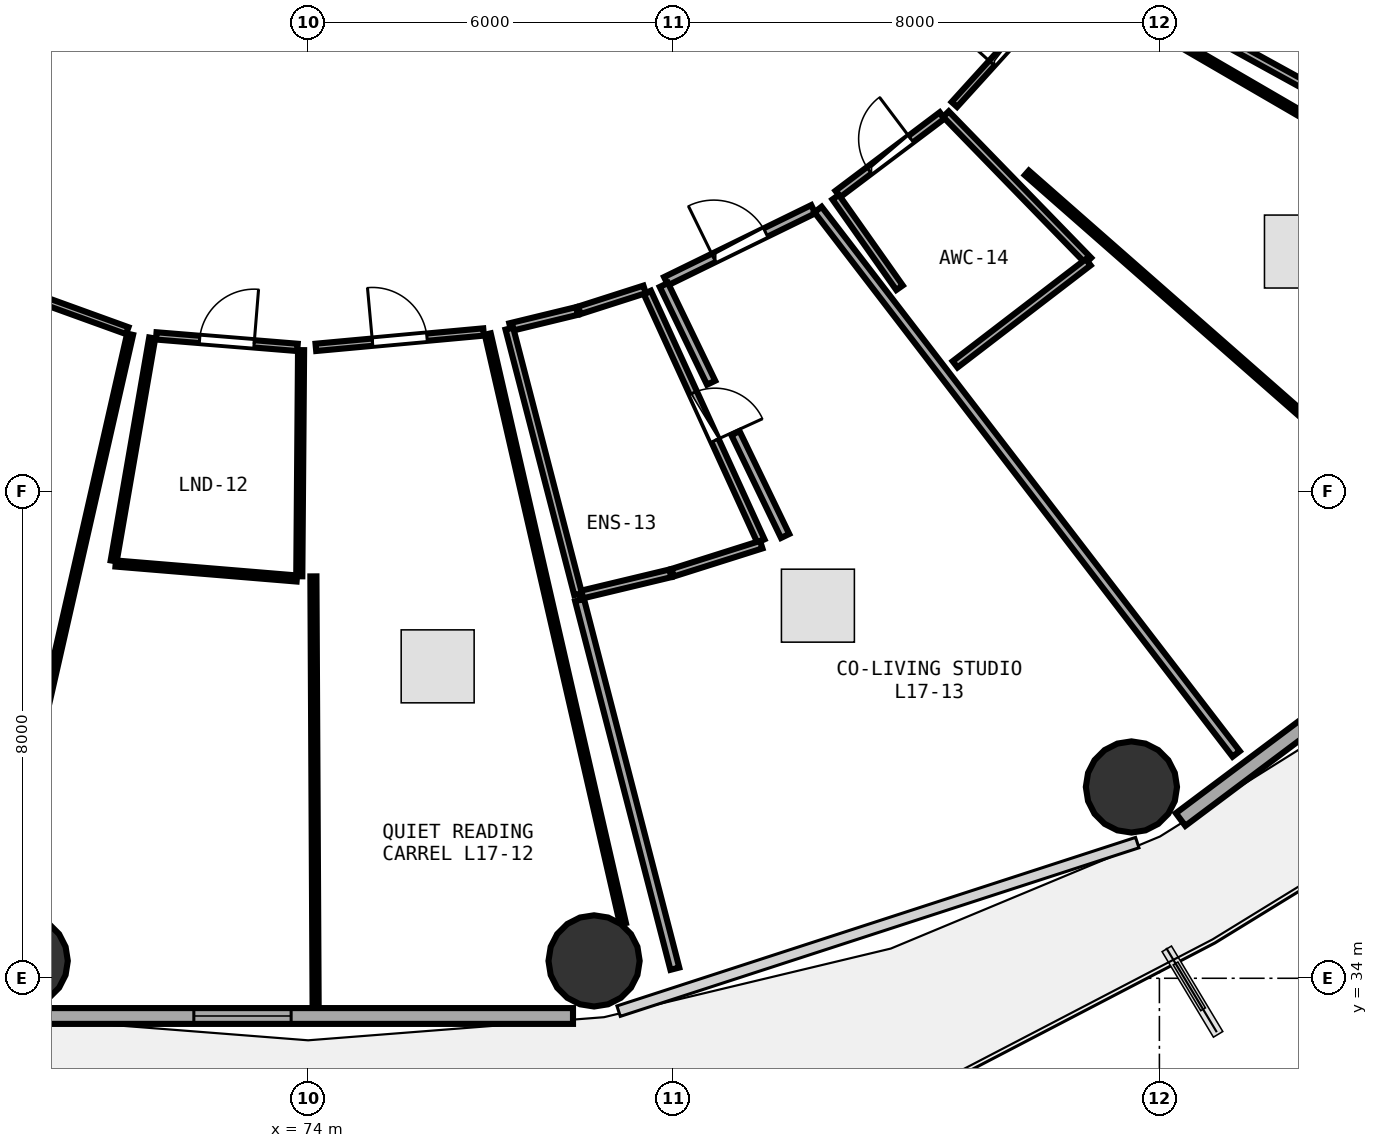
"""IFC4 building model, lengths in metres.
Left out: names, types, materials, properties, quantities, classifications, styles, units other than length and angle.
Written with IfcOpenShell. Run it as: python <this file> out.ifc"""

import sys

from ifc_helpers import new_model, si_unit, direction, frame, frame_2d, origin, origin_2d, place, context, subcontext, project, spatial, rectangle, circle, extrude, element, fill, save


model = new_model("IFC4")
c1 = context("Model", 3, precision=1e-05, world=origin(), true_north=direction((0.0, 1.0)))
c2 = subcontext(c1, "Body", "Model", "MODEL_VIEW")
j1 = project(units=[si_unit("LENGTHUNIT", "METRE"), si_unit("PLANEANGLEUNIT", "RADIAN")], contexts=[c1])
p1 = place(None, origin())
s1 = spatial("IfcSite", under=j1, at=p1, CompositionType="ELEMENT")
p2 = place(p1, origin())
s2 = spatial("IfcBuilding", under=s1, at=p2, CompositionType="ELEMENT")
p3 = place(p2, frame((0.0, 0.0, 67.5)))
s3 = spatial("IfcBuildingStorey", under=s2, at=p3, CompositionType="ELEMENT", Elevation=67.5)
for number, where, z_axis, x_axis in (
    (1, (69.298, 34.286, 0.0), (0.0, 0.0, 1.0), (1.0, 0.0, 0.0)),
    (2, (78.702, 34.286, 0.0), (0.0, 0.0, 1.0), (1.0, 0.0, 0.0)),
    (3, (87.54, 37.146, 0.0), (0.0, 0.0, 1.0), (1.0, 0.0, 0.0)),
):
    element("IfcColumn", number, at=place(p3, frame(where, z_axis=z_axis, x_axis=x_axis)), inside=s3, PredefinedType="COLUMN", context=c2, shape_type="SweptSolid", body=[
        extrude(circle(Radius=0.75, at=origin_2d()), origin(), (0.0, 0.0, 1.0), 4.76),
    ])
p4 = place(p3, frame((69.644, 33.38, 0.0), z_axis=(0.0, 0.0, 1.0), x_axis=(1.0, 0.0, 0.0)))
e4 = element("IfcWall", 4, at=p4, inside=s3, PredefinedType="SOLIDWALL", context=c2, shape_type="SweptSolid", body=[
    extrude(rectangle(XDim=8.712, YDim=0.26, at=frame_2d((4.356, 0.0))), origin(), (0.0, 0.0, 1.0), 4.345),
])
p5 = place(p4, frame((2.476, 0.0, 0.85)))
e5 = element("IfcOpeningElement", 5, at=p5, cuts=e4, PredefinedType="OPENING", context=c2, shape_type="SweptSolid", body=[
    extrude(rectangle(XDim=1.6, YDim=1.45, at=frame_2d((0.8, 0.725))), frame((0.0, 0.14, 0.0), z_axis=(0.0, -1.0, 0.0), x_axis=(1.0, 0.0, 0.0)), (0.0, 0.0, 1.0), 0.28),
])
p6 = place(p3, frame((88.349, 36.611, 0.0), z_axis=(0.0, 0.0, 1.0), x_axis=(0.80030733173, 0.599590005569, 0.0)))
e6 = element("IfcWall", 6, at=p6, inside=s3, PredefinedType="SOLIDWALL", context=c2, shape_type="SweptSolid", body=[
    extrude(rectangle(XDim=8.291, YDim=0.26, at=frame_2d((4.145, 0.0))), origin(), (0.0, 0.0, 1.0), 4.345),
])
p7 = place(p6, frame((3.345, 0.0, 0.85)))
e7 = element("IfcOpeningElement", 7, at=p7, cuts=e6, PredefinedType="OPENING", context=c2, shape_type="SweptSolid", body=[
    extrude(rectangle(XDim=1.6, YDim=1.45, at=frame_2d((0.8, 0.725))), frame((0.0, 0.14, 0.0), z_axis=(0.0, -1.0, 0.0), x_axis=(1.0, 0.0, 0.0)), (0.0, 0.0, 1.0), 0.28),
])
p8 = place(p3, frame((66.025, 46.458, 0.0), z_axis=(0.0, 0.0, 1.0), x_axis=(0.940384663849, -0.340112751891, 0.0)))
e8 = element("IfcWall", 8, at=p8, inside=s3, PredefinedType="PARTITIONING", context=c2, shape_type="SweptSolid", body=[
    extrude(rectangle(XDim=5.316, YDim=0.12, at=frame_2d((2.658, 0.0))), origin(), (0.0, 0.0, 1.0), 2.345),
])
p9 = place(p8, frame((2.208, 0.0, 0.0)))
e9 = element("IfcOpeningElement", 9, at=p9, cuts=e8, PredefinedType="OPENING", context=c2, shape_type="SweptSolid", body=[
    extrude(rectangle(XDim=0.9, YDim=2.08, at=frame_2d((0.45, 1.04))), frame((0.0, 0.07, 0.0), z_axis=(0.0, -1.0, 0.0), x_axis=(1.0, 0.0, 0.0)), (0.0, 0.0, 1.0), 0.14),
])
p10 = place(p3, frame((71.502, 44.564, 0.0), z_axis=(0.0, 0.0, 1.0), x_axis=(0.996697953598, -0.081198456222, 0.0)))
e10 = element("IfcWall", 10, at=p10, inside=s3, PredefinedType="PARTITIONING", context=c2, shape_type="SweptSolid", body=[
    extrude(rectangle(XDim=2.33, YDim=0.12, at=frame_2d((1.165, 0.0))), origin(), (0.0, 0.0, 1.0), 4.35),
])
p11 = place(p10, frame((0.715, 0.0, 0.0)))
e11 = element("IfcOpeningElement", 11, at=p11, cuts=e10, PredefinedType="OPENING", context=c2, shape_type="SweptSolid", body=[
    extrude(rectangle(XDim=0.9, YDim=2.08, at=frame_2d((0.45, 1.04))), frame((0.0, 0.07, 0.0), z_axis=(0.0, -1.0, 0.0), x_axis=(1.0, 0.0, 0.0)), (0.0, 0.0, 1.0), 0.14),
])
p12 = place(p3, frame((74.127, 44.375, 0.0), z_axis=(0.0, 0.0, 1.0), x_axis=(0.995822834643, 0.091306527718, 0.0)))
e12 = element("IfcWall", 12, at=p12, inside=s3, PredefinedType="PARTITIONING", context=c2, shape_type="SweptSolid", body=[
    extrude(rectangle(XDim=2.77, YDim=0.12, at=frame_2d((1.385, 0.0))), origin(), (0.0, 0.0, 1.0), 4.35),
])
p13 = place(p12, frame((0.935, 0.0, 0.0)))
e13 = element("IfcOpeningElement", 13, at=p13, cuts=e12, PredefinedType="OPENING", context=c2, shape_type="SweptSolid", body=[
    extrude(rectangle(XDim=0.9, YDim=2.08, at=frame_2d((0.45, 1.04))), frame((0.0, 0.07, 0.0), z_axis=(0.0, -1.0, 0.0), x_axis=(1.0, 0.0, 0.0)), (0.0, 0.0, 1.0), 0.14),
])
p14 = place(p3, frame((79.578, 45.281, 0.0), z_axis=(0.0, 0.0, 1.0), x_axis=(0.415569799266, -0.909561290919, 0.0)))
e14 = element("IfcWall", 14, at=p14, inside=s3, PredefinedType="PLUMBINGWALL", context=c2, shape_type="SweptSolid", body=[
    extrude(rectangle(XDim=4.495, YDim=0.13, at=frame_2d((2.248, 0.0))), origin(), (0.0, 0.0, 1.0), 2.345),
])
p15 = place(p14, frame((1.818, 0.0, 0.0)))
e15 = element("IfcOpeningElement", 15, at=p15, cuts=e14, PredefinedType="OPENING", context=c2, shape_type="SweptSolid", body=[
    extrude(rectangle(XDim=0.86, YDim=2.05, at=frame_2d((0.43, 1.025))), frame((0.0, 0.075, 0.0), z_axis=(0.0, -1.0, 0.0), x_axis=(1.0, 0.0, 0.0)), (0.0, 0.0, 1.0), 0.15),
])
p16 = place(p3, frame((79.887, 45.464, 0.0), z_axis=(0.0, 0.0, 1.0), x_axis=(0.898361315254, 0.439257267733, 0.0)))
e16 = element("IfcWall", 16, at=p16, inside=s3, PredefinedType="PARTITIONING", context=c2, shape_type="SweptSolid", body=[
    extrude(rectangle(XDim=2.694, YDim=0.15, at=frame_2d((1.347, 0.0))), origin(), (0.0, 0.0, 1.0), 2.345),
])
p17 = place(p16, frame((0.872, 0.0, 0.0)))
e17 = element("IfcOpeningElement", 17, at=p17, cuts=e16, PredefinedType="OPENING", context=c2, shape_type="SweptSolid", body=[
    extrude(rectangle(XDim=0.95, YDim=2.08, at=frame_2d((0.475, 1.04))), frame((0.0, 0.085, 0.0), z_axis=(0.0, -1.0, 0.0), x_axis=(1.0, 0.0, 0.0)), (0.0, 0.0, 1.0), 0.17),
])
p18 = place(p3, frame((82.712, 46.898, 0.0), z_axis=(0.0, 0.0, 1.0), x_axis=(0.798783982359, 0.601617943155, 0.0)))
e18 = element("IfcWall", 18, at=p18, inside=s3, PredefinedType="PLUMBINGWALL", context=c2, shape_type="SweptSolid", body=[
    extrude(rectangle(XDim=2.147, YDim=0.13, at=frame_2d((1.074, 0.0))), origin(), (0.0, 0.0, 1.0), 2.345),
])
p19 = place(p18, frame((0.644, 0.0, 0.0)))
e19 = element("IfcOpeningElement", 19, at=p19, cuts=e18, PredefinedType="OPENING", context=c2, shape_type="SweptSolid", body=[
    extrude(rectangle(XDim=0.86, YDim=2.05, at=frame_2d((0.43, 1.025))), frame((0.0, 0.075, 0.0), z_axis=(0.0, -1.0, 0.0), x_axis=(1.0, 0.0, 0.0)), (0.0, 0.0, 1.0), 0.15),
])
p20 = place(p3, frame((84.628, 48.37, 0.0), z_axis=(0.0, 0.0, 1.0), x_axis=(0.672036212067, 0.740518284495, 0.0)))
e20 = element("IfcWall", 20, at=p20, inside=s3, PredefinedType="PARTITIONING", context=c2, shape_type="SweptSolid", body=[
    extrude(rectangle(XDim=2.731, YDim=0.12, at=frame_2d((1.365, 0.0))), origin(), (0.0, 0.0, 1.0), 2.345),
])
p21 = place(p20, frame((0.915, 0.0, 0.0)))
e21 = element("IfcOpeningElement", 21, at=p21, cuts=e20, PredefinedType="OPENING", context=c2, shape_type="SweptSolid", body=[
    extrude(rectangle(XDim=0.9, YDim=2.08, at=frame_2d((0.45, 1.04))), frame((0.0, 0.07, 0.0), z_axis=(0.0, -1.0, 0.0), x_axis=(1.0, 0.0, 0.0)), (0.0, 0.0, 1.0), 0.14),
])
p22 = place(p3, frame((71.072, 44.591, 0.0), z_axis=(0.0, 0.0, 1.0), x_axis=(-0.221583796209, -0.975141333991, 0.0)))
e22 = element("IfcWall", 22, at=p22, inside=s3, PredefinedType="PARTITIONING", context=c2, shape_type="SweptSolid", body=[
    extrude(rectangle(XDim=9.9, YDim=0.1, at=frame_2d((4.95, 0.0))), origin(), (0.0, 0.0, 1.0), 2.345),
])
p23 = place(p3, frame((73.884, 44.33, 0.0), z_axis=(0.0, 0.0, 1.0), x_axis=(-0.007943030453, -0.999968453636, 0.0)))
e23 = element("IfcWall", 23, at=p23, inside=s3, PredefinedType="PARTITIONING", context=c2, shape_type="SweptSolid", body=[
    extrude(rectangle(XDim=3.719, YDim=0.1, at=frame_2d((1.859, 0.0))), origin(), (0.0, 0.0, 1.0), 4.045),
])
p24 = place(p3, frame((73.814, 40.574, 0.0), z_axis=(0.0, 0.0, 1.0), x_axis=(-0.996592348138, 0.08248449329, 0.0)))
e24 = element("IfcWall", 24, at=p24, inside=s3, PredefinedType="PARTITIONING", context=c2, shape_type="SweptSolid", body=[
    extrude(rectangle(XDim=2.99, YDim=0.1, at=frame_2d((1.495, 0.0))), origin(), (0.0, 0.0, 1.0), 4.35),
])
p25 = place(p3, frame((70.802, 40.863, 0.0), z_axis=(0.0, 0.0, 1.0), x_axis=(0.170280460959, 0.985395638622, 0.0)))
e25 = element("IfcWall", 25, at=p25, inside=s3, PredefinedType="PARTITIONING", context=c2, shape_type="SweptSolid", body=[
    extrude(rectangle(XDim=3.721, YDim=0.1, at=frame_2d((1.86, 0.0))), origin(), (0.0, 0.0, 1.0), 4.045),
])
p26 = place(p3, frame((76.954, 44.595, 0.0), z_axis=(0.0, 0.0, 1.0), x_axis=(0.223551012649, -0.97469223078, 0.0)))
e26 = element("IfcWall", 26, at=p26, inside=s3, PredefinedType="PARTITIONING", context=c2, shape_type="SweptSolid", body=[
    extrude(rectangle(XDim=9.949, YDim=0.1, at=frame_2d((4.975, 0.0))), origin(), (0.0, 0.0, 1.0), 2.345),
])
p27 = place(p3, frame((74.123, 33.56, 0.0), z_axis=(0.0, 0.0, 1.0), x_axis=(-0.005160461886, 0.999986684728, 0.0)))
e27 = element("IfcWall", 27, at=p27, inside=s3, PredefinedType="PARTITIONING", context=c2, shape_type="SweptSolid", body=[
    extrude(rectangle(XDim=7.049, YDim=0.1, at=frame_2d((3.524, 0.0))), origin(), (0.0, 0.0, 1.0), 2.345),
])
p28 = place(p3, frame((77.323, 44.708, 0.0), z_axis=(0.0, 0.0, 1.0), x_axis=(0.971820142712, 0.235723588592, 0.0)))
e28 = element("IfcWall", 28, at=p28, inside=s3, PredefinedType="PLUMBINGWALL", context=c2, shape_type="SweptSolid", body=[
    extrude(rectangle(XDim=1.131, YDim=0.13, at=frame_2d((0.565, 0.0))), origin(), (0.0, 0.0, 1.0), 4.35),
])
p29 = place(p3, frame((78.461, 44.985, 0.0), z_axis=(0.0, 0.0, 1.0), x_axis=(0.952323458584, 0.305090200156, 0.0)))
e29 = element("IfcWall", 29, at=p29, inside=s3, PredefinedType="PLUMBINGWALL", context=c2, shape_type="SweptSolid", body=[
    extrude(rectangle(XDim=1.127, YDim=0.13, at=frame_2d((0.563, 0.0))), origin(), (0.0, 0.0, 1.0), 4.105),
])
p30 = place(p3, frame((81.452, 41.131, 0.0), z_axis=(0.0, 0.0, 1.0), x_axis=(-0.953367513064, -0.301811837134, 0.0)))
e30 = element("IfcWall", 30, at=p30, inside=s3, PredefinedType="PLUMBINGWALL", context=c2, shape_type="SweptSolid", body=[
    extrude(rectangle(XDim=1.528, YDim=0.13, at=frame_2d((0.764, 0.0))), origin(), (0.0, 0.0, 1.0), 4.35),
])
p31 = place(p3, frame((79.957, 40.659, 0.0), z_axis=(0.0, 0.0, 1.0), x_axis=(-0.972491193781, -0.232939644584, 0.0)))
e31 = element("IfcWall", 31, at=p31, inside=s3, PredefinedType="PLUMBINGWALL", context=c2, shape_type="SweptSolid", body=[
    extrude(rectangle(XDim=1.534, YDim=0.13, at=frame_2d((0.767, 0.0))), origin(), (0.0, 0.0, 1.0), 2.345),
])
p32 = place(p3, frame((78.44, 40.316, 0.0), z_axis=(0.0, 0.0, 1.0), x_axis=(-0.250676669558, 0.968070868965, 0.0)))
e32 = element("IfcWall", 32, at=p32, inside=s3, PredefinedType="PLUMBINGWALL", context=c2, shape_type="SweptSolid", body=[
    extrude(rectangle(XDim=4.511, YDim=0.13, at=frame_2d((2.256, 0.0))), origin(), (0.0, 0.0, 1.0), 4.045),
])
p33 = place(p3, frame((82.385, 46.642, 0.0), z_axis=(0.0, 0.0, 1.0), x_axis=(0.6091849282, -0.793028198271, 0.0)))
e33 = element("IfcWall", 33, at=p33, inside=s3, PredefinedType="PARTITIONING", context=c2, shape_type="SweptSolid", body=[
    extrude(rectangle(XDim=11.289, YDim=0.15, at=frame_2d((5.645, 0.0))), origin(), (0.0, 0.0, 1.0), 2.345),
])
p34 = place(p3, frame((80.031, 34.158, 0.0), z_axis=(0.0, 0.0, 1.0), x_axis=(-0.250271908055, 0.968175589466, 0.0)))
e34 = element("IfcWall", 34, at=p34, inside=s3, PredefinedType="PARTITIONING", context=c2, shape_type="SweptSolid", body=[
    extrude(rectangle(XDim=6.261, YDim=0.15, at=frame_2d((3.13, 0.0))), origin(), (0.0, 0.0, 1.0), 2.345),
])
p35 = place(p3, frame((81.844, 41.274, 0.0), z_axis=(0.0, 0.0, 1.0), x_axis=(-0.43490172256, 0.900477924057, 0.0)))
e35 = element("IfcWall", 35, at=p35, inside=s3, PredefinedType="PARTITIONING", context=c2, shape_type="SweptSolid", body=[
    extrude(rectangle(XDim=1.878, YDim=0.15, at=frame_2d((0.939, 0.0))), origin(), (0.0, 0.0, 1.0), 4.045),
])
p36 = place(p3, frame((80.627, 43.794, 0.0), z_axis=(0.0, 0.0, 1.0), x_axis=(-0.434978422477, 0.900440876448, 0.0)))
e36 = element("IfcWall", 36, at=p36, inside=s3, PredefinedType="PARTITIONING", context=c2, shape_type="SweptSolid", body=[
    extrude(rectangle(XDim=1.786, YDim=0.15, at=frame_2d((0.893, 0.0))), origin(), (0.0, 0.0, 1.0), 2.345),
])
p37 = place(p3, frame((84.489, 48.212, 0.0), z_axis=(0.0, 0.0, 1.0), x_axis=(0.697008873448, -0.717062500996, 0.0)))
e37 = element("IfcWall", 37, at=p37, inside=s3, PredefinedType="PLUMBINGWALL", context=c2, shape_type="SweptSolid", body=[
    extrude(rectangle(XDim=3.36, YDim=0.13, at=frame_2d((1.68, 0.0))), origin(), (0.0, 0.0, 1.0), 4.105),
])
p38 = place(p3, frame((86.829, 45.776, 0.0), z_axis=(0.0, 0.0, 1.0), x_axis=(-0.793379880103, -0.608726840092, 0.0)))
e38 = element("IfcWall", 38, at=p38, inside=s3, PredefinedType="PLUMBINGWALL", context=c2, shape_type="SweptSolid", body=[
    extrude(rectangle(XDim=2.759, YDim=0.13, at=frame_2d((1.38, 0.0))), origin(), (0.0, 0.0, 1.0), 2.345),
])
p39 = place(p3, frame((83.726, 45.357, 0.0), z_axis=(0.0, 0.0, 1.0), x_axis=(-0.576488563642, 0.817105217209, 0.0)))
e39 = element("IfcWall", 39, at=p39, inside=s3, PredefinedType="PLUMBINGWALL", context=c2, shape_type="SweptSolid", body=[
    extrude(rectangle(XDim=1.822, YDim=0.13, at=frame_2d((0.911, 0.0))), origin(), (0.0, 0.0, 1.0), 2.345),
])
p40 = place(p3, frame((86.539, 50.417, 0.0), z_axis=(0.0, 0.0, 1.0), x_axis=(0.864576212426, -0.502501714333, 0.0)))
e40 = element("IfcWall", 40, at=p40, inside=s3, PredefinedType="PARTITIONING", context=c2, shape_type="SweptSolid", body=[
    extrude(rectangle(XDim=11.9, YDim=0.1, at=frame_2d((5.95, 0.0))), origin(), (0.0, 0.0, 1.0), 2.345),
])
p41 = place(p3, frame((93.328, 40.651, 0.0), z_axis=(0.0, 0.0, 1.0), x_axis=(-0.751420724703, 0.659823381282, 0.0)))
e41 = element("IfcWall", 41, at=p41, inside=s3, PredefinedType="PARTITIONING", context=c2, shape_type="SweptSolid", body=[
    extrude(rectangle(XDim=9.992, YDim=0.1, at=frame_2d((4.996, 0.0))), origin(), (0.0, 0.0, 1.0), 2.345),
])
p42 = place(p3, frame((91.073, 48.312, 0.0), z_axis=(0.0, 0.0, 1.0), x_axis=(-0.87605188001, 0.48221686359, 0.0)))
e42 = element("IfcWall", 42, at=p42, inside=s3, PredefinedType="PLUMBINGWALL", context=c2, shape_type="SweptSolid", body=[
    extrude(rectangle(XDim=4.967, YDim=0.13, at=frame_2d((2.483, 0.0))), origin(), (0.0, 0.0, 1.0), 2.345),
])
p43 = place(p5, origin())
e43 = element("IfcWindow", 43, at=p43, inside=s3, PartitioningType="SINGLE_PANEL", PredefinedType="WINDOW", context=c2, shape_type="SweptSolid", body=[
    extrude(rectangle(XDim=1.6, YDim=1.45, at=frame_2d((0.8, 0.725))), frame((0.0, 0.03, 0.0), z_axis=(0.0, -1.0, 0.0), x_axis=(1.0, 0.0, 0.0)), (0.0, 0.0, 1.0), 0.06),
])
fill(e5, e43)
p44 = place(p11, origin())
e44 = element("IfcDoor", 44, at=p44, inside=s3, OperationType="SINGLE_SWING_RIGHT", PredefinedType="DOOR", context=c2, shape_type="SweptSolid", body=[
    extrude(rectangle(XDim=0.9, YDim=2.08, at=frame_2d((0.45, 1.04))), frame((0.0, 0.025, 0.0), z_axis=(0.0, -1.0, 0.0), x_axis=(1.0, 0.0, 0.0)), (0.0, 0.0, 1.0), 0.05),
])
fill(e11, e44)
p45 = place(p13, origin())
e45 = element("IfcDoor", 45, at=p45, inside=s3, OperationType="SINGLE_SWING_LEFT", PredefinedType="DOOR", context=c2, shape_type="SweptSolid", body=[
    extrude(rectangle(XDim=0.9, YDim=2.08, at=frame_2d((0.45, 1.04))), frame((0.0, 0.025, 0.0), z_axis=(0.0, -1.0, 0.0), x_axis=(1.0, 0.0, 0.0)), (0.0, 0.0, 1.0), 0.05),
])
fill(e13, e45)
p46 = place(p15, origin())
e46 = element("IfcDoor", 46, at=p46, inside=s3, OperationType="SINGLE_SWING_RIGHT", PredefinedType="DOOR", context=c2, shape_type="SweptSolid", body=[
    extrude(rectangle(XDim=0.86, YDim=2.05, at=frame_2d((0.43, 1.025))), frame((0.0, 0.025, 0.0), z_axis=(0.0, -1.0, 0.0), x_axis=(1.0, 0.0, 0.0)), (0.0, 0.0, 1.0), 0.05),
])
fill(e15, e46)
p47 = place(p17, origin())
e47 = element("IfcDoor", 47, at=p47, inside=s3, OperationType="SINGLE_SWING_LEFT", PredefinedType="DOOR", context=c2, shape_type="SweptSolid", body=[
    extrude(rectangle(XDim=0.95, YDim=2.08, at=frame_2d((0.475, 1.04))), frame((0.0, 0.025, 0.0), z_axis=(0.0, -1.0, 0.0), x_axis=(1.0, 0.0, 0.0)), (0.0, 0.0, 1.0), 0.05),
])
fill(e17, e47)
p48 = place(p19, origin())
e48 = element("IfcDoor", 48, at=p48, inside=s3, OperationType="SINGLE_SWING_RIGHT", PredefinedType="DOOR", context=c2, shape_type="SweptSolid", body=[
    extrude(rectangle(XDim=0.86, YDim=2.05, at=frame_2d((0.43, 1.025))), frame((0.0, 0.025, 0.0), z_axis=(0.0, -1.0, 0.0), x_axis=(1.0, 0.0, 0.0)), (0.0, 0.0, 1.0), 0.05),
])
fill(e19, e48)
p49 = place(p21, origin())
e49 = element("IfcDoor", 49, at=p49, inside=s3, OperationType="SINGLE_SWING_LEFT", PredefinedType="DOOR", context=c2, shape_type="SweptSolid", body=[
    extrude(rectangle(XDim=0.9, YDim=2.08, at=frame_2d((0.45, 1.04))), frame((0.0, 0.025, 0.0), z_axis=(0.0, -1.0, 0.0), x_axis=(1.0, 0.0, 0.0)), (0.0, 0.0, 1.0), 0.05),
])
fill(e21, e49)
save(model, sys.argv[1])
